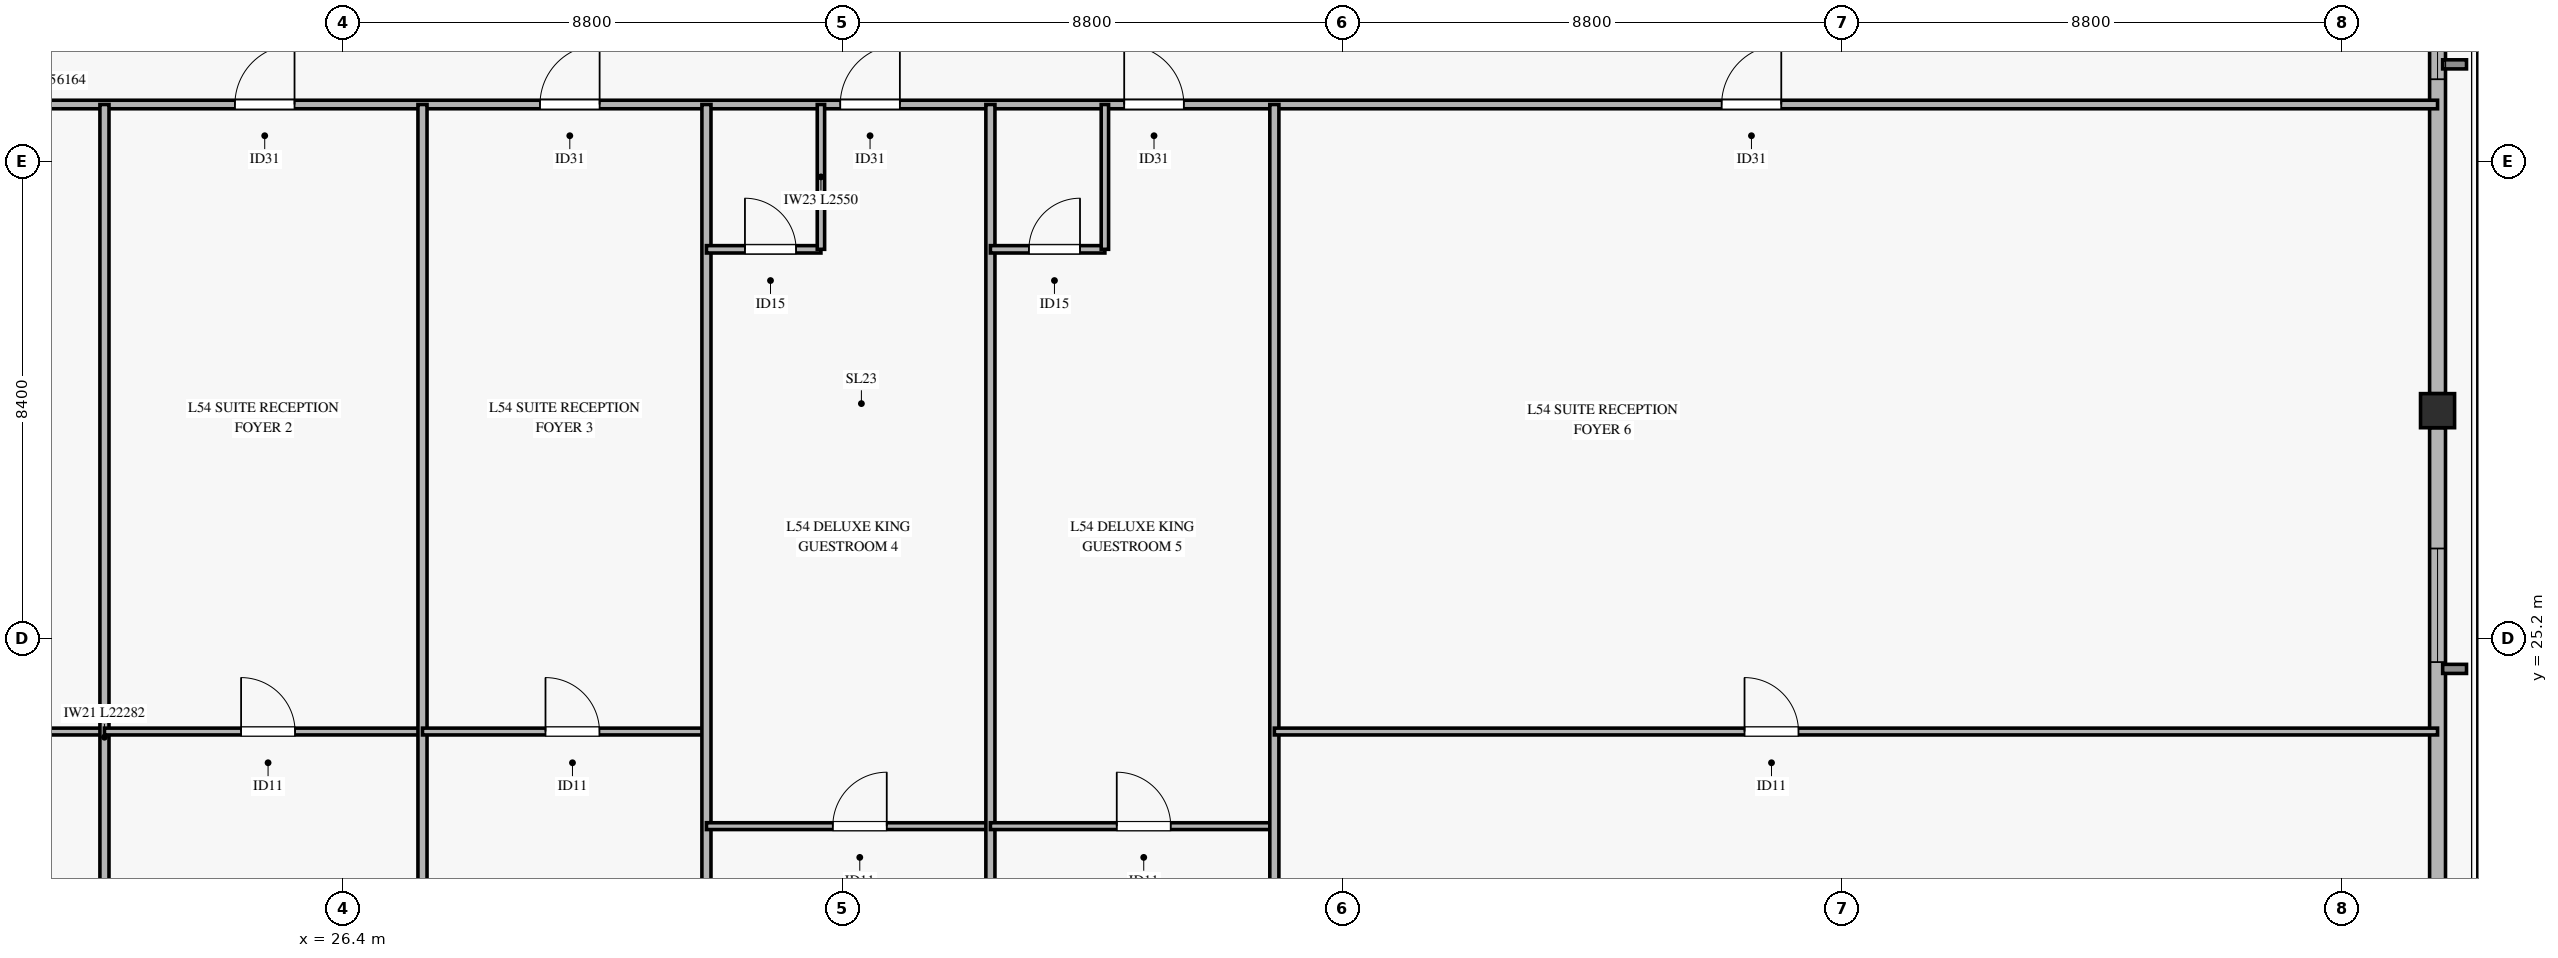
"""IFC4 building model, lengths in metres.
Left out: names, types, materials, properties, quantities, classifications, styles, units other than length and angle.
Written with IfcOpenShell. Run it as: python <this file> out.ifc"""

import sys

from ifc_helpers import new_model, si_unit, direction, frame, frame_2d, origin, origin_2d, place, context, subcontext, project, spatial, rectangle, hollow_rectangle, extrude, source, transform, mapped, element, fill, save


model = new_model("IFC4")
c1 = context("Model", 3, precision=1e-05, world=origin(), true_north=direction((0.0, 1.0)))
c2 = subcontext(c1, "Body", "Model", "MODEL_VIEW")
j1 = project(units=[si_unit("LENGTHUNIT", "METRE"), si_unit("PLANEANGLEUNIT", "RADIAN")], contexts=[c1])
p1 = place(None, origin())
s1 = spatial("IfcSite", under=j1, at=p1, CompositionType="ELEMENT")
p2 = place(p1, origin())
s2 = spatial("IfcBuilding", under=s1, at=p2, CompositionType="ELEMENT")
p3 = place(p2, frame((0.0, 0.0, 213.2)))
s3 = spatial("IfcBuildingStorey", under=s2, at=p3, CompositionType="ELEMENT", Elevation=213.2)
m1 = source(origin(), c2, "Body", "SweptSolid", [
    extrude(hollow_rectangle(XDim=0.6, YDim=0.6, WallThickness=0.028, at=origin_2d()), origin(), (0.0, 0.0, 1.0), 3.27),
])
p4 = place(p3, frame((63.282, 29.209, 0.0), z_axis=(0.0, 0.0, 1.0), x_axis=(1.0, 0.0, 0.0)))
e1 = element("IfcColumn", 1, at=p4, inside=s3, PredefinedType="COLUMN", context=c2, shape_type="MappedRepresentation", body=[
    mapped(m1, transform((0.0, 0.0, 0.0), x_axis=(1.0, 0.0, 0.0), y_axis=(0.0, 1.0, 0.0), z_axis=(0.0, 0.0, 1.0), scale=1.0)),
])
p5 = place(p3, frame((63.282, 15.072, 0.0), z_axis=(0.0, 0.0, 1.0), x_axis=(0.0, 1.0, 0.0)))
e2 = element("IfcWall", 2, at=p5, inside=s3, PredefinedType="SOLIDWALL", context=c2, shape_type="SweptSolid", body=[
    extrude(rectangle(XDim=13.837, YDim=0.28, at=frame_2d((6.918, 0.0))), origin(), (0.0, 0.0, 1.0), 2.75),
])
p6 = place(p5, frame((9.71, 0.0, 0.45)))
e3 = element("IfcOpeningElement", 3, at=p6, cuts=e2, PredefinedType="OPENING", context=c2, shape_type="SweptSolid", body=[
    extrude(rectangle(XDim=2.0, YDim=2.0, at=frame_2d((1.0, 1.0))), frame((0.0, 0.15, 0.0), z_axis=(0.0, -1.0, 0.0), x_axis=(1.0, 0.0, 0.0)), (0.0, 0.0, 1.0), 0.3),
])
p7 = place(p3, frame((63.282, 29.509, 0.0), z_axis=(0.0, 0.0, 1.0), x_axis=(0.0, 1.0, 0.0)))
e4 = element("IfcWall", 4, at=p7, inside=s3, PredefinedType="SOLIDWALL", context=c2, shape_type="SweptSolid", body=[
    extrude(rectangle(XDim=13.837, YDim=0.28, at=frame_2d((6.918, 0.0))), origin(), (0.0, 0.0, 1.0), 2.75),
])
p8 = place(p7, frame((5.536, 0.0, 0.45)))
e5 = element("IfcOpeningElement", 5, at=p8, cuts=e4, PredefinedType="OPENING", context=c2, shape_type="SweptSolid", body=[
    extrude(rectangle(XDim=2.0, YDim=2.0, at=frame_2d((1.0, 1.0))), frame((0.0, 0.15, 0.0), z_axis=(0.0, -1.0, 0.0), x_axis=(1.0, 0.0, 0.0)), (0.0, 0.0, 1.0), 0.3),
])
p9 = place(p3, frame((7.118, 34.6, 0.0), z_axis=(0.0, 0.0, 1.0), x_axis=(1.0, 0.0, 0.0)))
e6 = element("IfcWall", 6, at=p9, inside=s3, PredefinedType="PARTITIONING", context=c2, shape_type="SweptSolid", body=[
    extrude(rectangle(XDim=56.164, YDim=0.15, at=frame_2d((28.082, 0.0))), origin(), (0.0, 0.0, 1.0), 2.455),
])
p10 = place(p9, frame((6.024, 0.0, 0.0)))
e7 = element("IfcOpeningElement", 7, at=p10, cuts=e6, PredefinedType="OPENING", context=c2, shape_type="SweptSolid", body=[
    extrude(rectangle(XDim=1.05, YDim=2.15, at=frame_2d((0.525, 1.075))), frame((0.0, 0.085, 0.0), z_axis=(0.0, -1.0, 0.0), x_axis=(1.0, 0.0, 0.0)), (0.0, 0.0, 1.0), 0.17),
])
p11 = place(p9, frame((17.379, 0.0, 0.0)))
e8 = element("IfcOpeningElement", 8, at=p11, cuts=e6, PredefinedType="OPENING", context=c2, shape_type="SweptSolid", body=[
    extrude(rectangle(XDim=1.05, YDim=2.15, at=frame_2d((0.525, 1.075))), frame((0.0, 0.085, 0.0), z_axis=(0.0, -1.0, 0.0), x_axis=(1.0, 0.0, 0.0)), (0.0, 0.0, 1.0), 0.17),
])
p12 = place(p9, frame((22.751, 0.0, 0.0)))
e9 = element("IfcOpeningElement", 9, at=p12, cuts=e6, PredefinedType="OPENING", context=c2, shape_type="SweptSolid", body=[
    extrude(rectangle(XDim=1.05, YDim=2.15, at=frame_2d((0.525, 1.075))), frame((0.0, 0.085, 0.0), z_axis=(0.0, -1.0, 0.0), x_axis=(1.0, 0.0, 0.0)), (0.0, 0.0, 1.0), 0.17),
])
p13 = place(p9, frame((28.038, 0.0, 0.0)))
e10 = element("IfcOpeningElement", 10, at=p13, cuts=e6, PredefinedType="OPENING", context=c2, shape_type="SweptSolid", body=[
    extrude(rectangle(XDim=1.05, YDim=2.15, at=frame_2d((0.525, 1.075))), frame((0.0, 0.085, 0.0), z_axis=(0.0, -1.0, 0.0), x_axis=(1.0, 0.0, 0.0)), (0.0, 0.0, 1.0), 0.17),
])
p14 = place(p9, frame((33.038, 0.0, 0.0)))
e11 = element("IfcOpeningElement", 11, at=p14, cuts=e6, PredefinedType="OPENING", context=c2, shape_type="SweptSolid", body=[
    extrude(rectangle(XDim=1.05, YDim=2.15, at=frame_2d((0.525, 1.075))), frame((0.0, 0.085, 0.0), z_axis=(0.0, -1.0, 0.0), x_axis=(1.0, 0.0, 0.0)), (0.0, 0.0, 1.0), 0.17),
])
p15 = place(p9, frame((43.558, 0.0, 0.0)))
e12 = element("IfcOpeningElement", 12, at=p15, cuts=e6, PredefinedType="OPENING", context=c2, shape_type="SweptSolid", body=[
    extrude(rectangle(XDim=1.05, YDim=2.15, at=frame_2d((0.525, 1.075))), frame((0.0, 0.085, 0.0), z_axis=(0.0, -1.0, 0.0), x_axis=(1.0, 0.0, 0.0)), (0.0, 0.0, 1.0), 0.17),
])
p16 = place(p3, frame((7.118, 23.559, 0.0), z_axis=(0.0, 0.0, 1.0), x_axis=(1.0, 0.0, 0.0)))
e13 = element("IfcWall", 13, at=p16, inside=s3, PredefinedType="PARTITIONING", context=c2, shape_type="SweptSolid", body=[
    extrude(rectangle(XDim=15.082, YDim=0.12, at=frame_2d((7.541, 0.0))), origin(), (0.0, 0.0, 1.0), 2.455),
])
p17 = place(p16, frame((6.319, 0.0, 0.0)))
e14 = element("IfcOpeningElement", 14, at=p17, cuts=e13, PredefinedType="OPENING", context=c2, shape_type="SweptSolid", body=[
    extrude(rectangle(XDim=0.95, YDim=2.1, at=frame_2d((0.475, 1.05))), frame((0.0, 0.07, 0.0), z_axis=(0.0, -1.0, 0.0), x_axis=(1.0, 0.0, 0.0)), (0.0, 0.0, 1.0), 0.14),
])
p18 = place(p3, frame((22.2, 12.318, 0.0), z_axis=(0.0, 0.0, 1.0), x_axis=(0.0, 1.0, 0.0)))
e15 = element("IfcWall", 15, at=p18, inside=s3, PredefinedType="PARTITIONING", context=c2, shape_type="SweptSolid", body=[
    extrude(rectangle(XDim=22.282, YDim=0.16, at=frame_2d((11.141, 0.0))), origin(), (0.0, 0.0, 1.0), 2.755),
])
p19 = place(p3, frame((22.2, 23.559, 0.0), z_axis=(0.0, 0.0, 1.0), x_axis=(1.0, 0.0, 0.0)))
e16 = element("IfcWall", 16, at=p19, inside=s3, PredefinedType="PARTITIONING", context=c2, shape_type="SweptSolid", body=[
    extrude(rectangle(XDim=5.6, YDim=0.12, at=frame_2d((2.8, 0.0))), origin(), (0.0, 0.0, 1.0), 3.27),
])
p20 = place(p19, frame((2.406, 0.0, 0.0)))
e17 = element("IfcOpeningElement", 17, at=p20, cuts=e16, PredefinedType="OPENING", context=c2, shape_type="SweptSolid", body=[
    extrude(rectangle(XDim=0.95, YDim=2.1, at=frame_2d((0.475, 1.05))), frame((0.0, 0.07, 0.0), z_axis=(0.0, -1.0, 0.0), x_axis=(1.0, 0.0, 0.0)), (0.0, 0.0, 1.0), 0.14),
])
p21 = place(p3, frame((27.8, 12.318, 0.0), z_axis=(0.0, 0.0, 1.0), x_axis=(0.0, 1.0, 0.0)))
e18 = element("IfcWall", 18, at=p21, inside=s3, PredefinedType="PARTITIONING", context=c2, shape_type="SweptSolid", body=[
    extrude(rectangle(XDim=22.282, YDim=0.16, at=frame_2d((11.141, 0.0))), origin(), (0.0, 0.0, 1.0), 2.755),
])
p22 = place(p3, frame((27.8, 23.559, 0.0), z_axis=(0.0, 0.0, 1.0), x_axis=(1.0, 0.0, 0.0)))
e19 = element("IfcWall", 19, at=p22, inside=s3, PredefinedType="PARTITIONING", context=c2, shape_type="SweptSolid", body=[
    extrude(rectangle(XDim=5.0, YDim=0.12, at=frame_2d((2.5, 0.0))), origin(), (0.0, 0.0, 1.0), 2.455),
])
p23 = place(p22, frame((2.166, 0.0, 0.0)))
e20 = element("IfcOpeningElement", 20, at=p23, cuts=e19, PredefinedType="OPENING", context=c2, shape_type="SweptSolid", body=[
    extrude(rectangle(XDim=0.95, YDim=2.1, at=frame_2d((0.475, 1.05))), frame((0.0, 0.07, 0.0), z_axis=(0.0, -1.0, 0.0), x_axis=(1.0, 0.0, 0.0)), (0.0, 0.0, 1.0), 0.14),
])
p24 = place(p3, frame((32.8, 12.318, 0.0), z_axis=(0.0, 0.0, 1.0), x_axis=(0.0, 1.0, 0.0)))
e21 = element("IfcWall", 21, at=p24, inside=s3, PredefinedType="PARTITIONING", context=c2, shape_type="SweptSolid", body=[
    extrude(rectangle(XDim=22.282, YDim=0.16, at=frame_2d((11.141, 0.0))), origin(), (0.0, 0.0, 1.0), 2.755),
])
p25 = place(p3, frame((32.8, 32.05, 0.0), z_axis=(0.0, 0.0, 1.0), x_axis=(1.0, 0.0, 0.0)))
e22 = element("IfcWall", 22, at=p25, inside=s3, PredefinedType="PARTITIONING", context=c2, shape_type="SweptSolid", body=[
    extrude(rectangle(XDim=2.016, YDim=0.13, at=frame_2d((1.008, 0.0))), origin(), (0.0, 0.0, 1.0), 3.27),
])
p26 = place(p25, frame((0.678, 0.0, 0.0)))
e23 = element("IfcOpeningElement", 23, at=p26, cuts=e22, PredefinedType="OPENING", context=c2, shape_type="SweptSolid", body=[
    extrude(rectangle(XDim=0.9, YDim=2.1, at=frame_2d((0.45, 1.05))), frame((0.0, 0.075, 0.0), z_axis=(0.0, -1.0, 0.0), x_axis=(1.0, 0.0, 0.0)), (0.0, 0.0, 1.0), 0.15),
])
p27 = place(p3, frame((34.816, 32.05, 0.0), z_axis=(0.0, 0.0, 1.0), x_axis=(0.0, 1.0, 0.0)))
e24 = element("IfcWall", 24, at=p27, inside=s3, PredefinedType="PARTITIONING", context=c2, shape_type="SweptSolid", body=[
    extrude(rectangle(XDim=2.55, YDim=0.13, at=frame_2d((1.275, 0.0))), origin(), (0.0, 0.0, 1.0), 2.855),
])
p28 = place(p3, frame((32.8, 21.893, 0.0), z_axis=(0.0, 0.0, 1.0), x_axis=(1.0, 0.0, 0.0)))
e25 = element("IfcWall", 25, at=p28, inside=s3, PredefinedType="PARTITIONING", context=c2, shape_type="SweptSolid", body=[
    extrude(rectangle(XDim=5.0, YDim=0.12, at=frame_2d((2.5, 0.0))), origin(), (0.0, 0.0, 1.0), 2.455),
])
p29 = place(p28, frame((2.225, 0.0, 0.0)))
e26 = element("IfcOpeningElement", 26, at=p29, cuts=e25, PredefinedType="OPENING", context=c2, shape_type="SweptSolid", body=[
    extrude(rectangle(XDim=0.95, YDim=2.1, at=frame_2d((0.475, 1.05))), frame((0.0, 0.07, 0.0), z_axis=(0.0, -1.0, 0.0), x_axis=(1.0, 0.0, 0.0)), (0.0, 0.0, 1.0), 0.14),
])
p30 = place(p3, frame((37.8, 12.318, 0.0), z_axis=(0.0, 0.0, 1.0), x_axis=(0.0, 1.0, 0.0)))
e27 = element("IfcWall", 27, at=p30, inside=s3, PredefinedType="PARTITIONING", context=c2, shape_type="SweptSolid", body=[
    extrude(rectangle(XDim=22.282, YDim=0.16, at=frame_2d((11.141, 0.0))), origin(), (0.0, 0.0, 1.0), 2.455),
])
p31 = place(p3, frame((37.8, 32.05, 0.0), z_axis=(0.0, 0.0, 1.0), x_axis=(1.0, 0.0, 0.0)))
e28 = element("IfcWall", 28, at=p31, inside=s3, PredefinedType="PARTITIONING", context=c2, shape_type="SweptSolid", body=[
    extrude(rectangle(XDim=2.016, YDim=0.13, at=frame_2d((1.008, 0.0))), origin(), (0.0, 0.0, 1.0), 3.27),
])
p32 = place(p31, frame((0.678, 0.0, 0.0)))
e29 = element("IfcOpeningElement", 29, at=p32, cuts=e28, PredefinedType="OPENING", context=c2, shape_type="SweptSolid", body=[
    extrude(rectangle(XDim=0.9, YDim=2.1, at=frame_2d((0.45, 1.05))), frame((0.0, 0.075, 0.0), z_axis=(0.0, -1.0, 0.0), x_axis=(1.0, 0.0, 0.0)), (0.0, 0.0, 1.0), 0.15),
])
p33 = place(p3, frame((39.816, 32.05, 0.0), z_axis=(0.0, 0.0, 1.0), x_axis=(0.0, 1.0, 0.0)))
e30 = element("IfcWall", 30, at=p33, inside=s3, PredefinedType="PARTITIONING", context=c2, shape_type="SweptSolid", body=[
    extrude(rectangle(XDim=2.55, YDim=0.13, at=frame_2d((1.275, 0.0))), origin(), (0.0, 0.0, 1.0), 2.855),
])
p34 = place(p3, frame((37.8, 21.893, 0.0), z_axis=(0.0, 0.0, 1.0), x_axis=(1.0, 0.0, 0.0)))
e31 = element("IfcWall", 31, at=p34, inside=s3, PredefinedType="PARTITIONING", context=c2, shape_type="SweptSolid", body=[
    extrude(rectangle(XDim=5.0, YDim=0.12, at=frame_2d((2.5, 0.0))), origin(), (0.0, 0.0, 1.0), 3.27),
])
p35 = place(p34, frame((2.225, 0.0, 0.0)))
e32 = element("IfcOpeningElement", 32, at=p35, cuts=e31, PredefinedType="OPENING", context=c2, shape_type="SweptSolid", body=[
    extrude(rectangle(XDim=0.95, YDim=2.1, at=frame_2d((0.475, 1.05))), frame((0.0, 0.07, 0.0), z_axis=(0.0, -1.0, 0.0), x_axis=(1.0, 0.0, 0.0)), (0.0, 0.0, 1.0), 0.14),
])
p36 = place(p3, frame((42.8, 12.318, 0.0), z_axis=(0.0, 0.0, 1.0), x_axis=(0.0, 1.0, 0.0)))
e33 = element("IfcWall", 33, at=p36, inside=s3, PredefinedType="PARTITIONING", context=c2, shape_type="SweptSolid", body=[
    extrude(rectangle(XDim=22.282, YDim=0.16, at=frame_2d((11.141, 0.0))), origin(), (0.0, 0.0, 1.0), 2.755),
])
p37 = place(p3, frame((42.8, 23.559, 0.0), z_axis=(0.0, 0.0, 1.0), x_axis=(1.0, 0.0, 0.0)))
e34 = element("IfcWall", 34, at=p37, inside=s3, PredefinedType="PARTITIONING", context=c2, shape_type="SweptSolid", body=[
    extrude(rectangle(XDim=20.482, YDim=0.12, at=frame_2d((10.241, 0.0))), origin(), (0.0, 0.0, 1.0), 2.455),
])
p38 = place(p37, frame((8.279, 0.0, 0.0)))
e35 = element("IfcOpeningElement", 35, at=p38, cuts=e34, PredefinedType="OPENING", context=c2, shape_type="SweptSolid", body=[
    extrude(rectangle(XDim=0.95, YDim=2.1, at=frame_2d((0.475, 1.05))), frame((0.0, 0.07, 0.0), z_axis=(0.0, -1.0, 0.0), x_axis=(1.0, 0.0, 0.0)), (0.0, 0.0, 1.0), 0.14),
])
m2 = source(origin(), c2, "Body", "SweptSolid", [
    extrude(rectangle(XDim=2.0, YDim=2.0, at=frame_2d((1.0, 1.0))), frame((0.0, 0.03, 0.0), z_axis=(0.0, -1.0, 0.0), x_axis=(1.0, 0.0, 0.0)), (0.0, 0.0, 1.0), 0.06),
])
p39 = place(p6, origin())
e36 = element("IfcWindow", 36, at=p39, inside=s3, PartitioningType="SINGLE_PANEL", PredefinedType="WINDOW", context=c2, shape_type="MappedRepresentation", body=[
    mapped(m2, transform((0.0, 0.0, 0.0), x_axis=(1.0, 0.0, 0.0), y_axis=(0.0, 1.0, 0.0), z_axis=(0.0, 0.0, 1.0), scale=1.0)),
])
fill(e3, e36)
p40 = place(p8, origin())
e37 = element("IfcWindow", 37, at=p40, inside=s3, PartitioningType="SINGLE_PANEL", PredefinedType="WINDOW", context=c2, shape_type="MappedRepresentation", body=[
    mapped(m2, transform((0.0, 0.0, 0.0), x_axis=(1.0, 0.0, 0.0), y_axis=(0.0, 1.0, 0.0), z_axis=(0.0, 0.0, 1.0), scale=1.0)),
])
fill(e5, e37)
m3 = source(origin(), c2, "Body", "SweptSolid", [
    extrude(rectangle(XDim=1.05, YDim=2.15, at=frame_2d((0.525, 1.075))), frame((0.0, 0.025, 0.0), z_axis=(0.0, -1.0, 0.0), x_axis=(1.0, 0.0, 0.0)), (0.0, 0.0, 1.0), 0.05),
])
p41 = place(p11, origin())
e38 = element("IfcDoor", 38, at=p41, inside=s3, OperationType="SINGLE_SWING_RIGHT", PredefinedType="DOOR", context=c2, shape_type="MappedRepresentation", body=[
    mapped(m3, transform((0.0, 0.0, 0.0), x_axis=(1.0, 0.0, 0.0), y_axis=(0.0, 1.0, 0.0), z_axis=(0.0, 0.0, 1.0), scale=1.0)),
])
fill(e8, e38)
m4 = source(origin(), c2, "Body", "SweptSolid", [
    extrude(rectangle(XDim=0.95, YDim=2.1, at=frame_2d((0.475, 1.05))), frame((0.0, 0.025, 0.0), z_axis=(0.0, -1.0, 0.0), x_axis=(1.0, 0.0, 0.0)), (0.0, 0.0, 1.0), 0.05),
])
p42 = place(p20, origin())
e39 = element("IfcDoor", 39, at=p42, inside=s3, OperationType="SINGLE_SWING_LEFT", PredefinedType="DOOR", context=c2, shape_type="MappedRepresentation", body=[
    mapped(m4, transform((0.0, 0.0, 0.0), x_axis=(1.0, 0.0, 0.0), y_axis=(0.0, 1.0, 0.0), z_axis=(0.0, 0.0, 1.0), scale=1.0)),
])
fill(e17, e39)
p43 = place(p12, origin())
e40 = element("IfcDoor", 40, at=p43, inside=s3, OperationType="SINGLE_SWING_RIGHT", PredefinedType="DOOR", context=c2, shape_type="MappedRepresentation", body=[
    mapped(m3, transform((0.0, 0.0, 0.0), x_axis=(1.0, 0.0, 0.0), y_axis=(0.0, 1.0, 0.0), z_axis=(0.0, 0.0, 1.0), scale=1.0)),
])
fill(e9, e40)
p44 = place(p23, origin())
e41 = element("IfcDoor", 41, at=p44, inside=s3, OperationType="SINGLE_SWING_LEFT", PredefinedType="DOOR", context=c2, shape_type="MappedRepresentation", body=[
    mapped(m4, transform((0.0, 0.0, 0.0), x_axis=(1.0, 0.0, 0.0), y_axis=(0.0, 1.0, 0.0), z_axis=(0.0, 0.0, 1.0), scale=1.0)),
])
fill(e20, e41)
p45 = place(p13, origin())
e42 = element("IfcDoor", 42, at=p45, inside=s3, OperationType="SINGLE_SWING_RIGHT", PredefinedType="DOOR", context=c2, shape_type="MappedRepresentation", body=[
    mapped(m3, transform((0.0, 0.0, 0.0), x_axis=(1.0, 0.0, 0.0), y_axis=(0.0, 1.0, 0.0), z_axis=(0.0, 0.0, 1.0), scale=1.0)),
])
fill(e10, e42)
m5 = source(origin(), c2, "Body", "SweptSolid", [
    extrude(rectangle(XDim=0.9, YDim=2.1, at=frame_2d((0.45, 1.05))), frame((0.0, 0.025, 0.0), z_axis=(0.0, -1.0, 0.0), x_axis=(1.0, 0.0, 0.0)), (0.0, 0.0, 1.0), 0.05),
])
p46 = place(p26, origin())
e43 = element("IfcDoor", 43, at=p46, inside=s3, OperationType="SINGLE_SWING_LEFT", PredefinedType="DOOR", context=c2, shape_type="MappedRepresentation", body=[
    mapped(m5, transform((0.0, 0.0, 0.0), x_axis=(1.0, 0.0, 0.0), y_axis=(0.0, 1.0, 0.0), z_axis=(0.0, 0.0, 1.0), scale=1.0)),
])
fill(e23, e43)
p47 = place(p29, origin())
e44 = element("IfcDoor", 44, at=p47, inside=s3, OperationType="SINGLE_SWING_RIGHT", PredefinedType="DOOR", context=c2, shape_type="MappedRepresentation", body=[
    mapped(m4, transform((0.0, 0.0, 0.0), x_axis=(1.0, 0.0, 0.0), y_axis=(0.0, 1.0, 0.0), z_axis=(0.0, 0.0, 1.0), scale=1.0)),
])
fill(e26, e44)
p48 = place(p14, origin())
e45 = element("IfcDoor", 45, at=p48, inside=s3, OperationType="SINGLE_SWING_LEFT", PredefinedType="DOOR", context=c2, shape_type="MappedRepresentation", body=[
    mapped(m3, transform((0.0, 0.0, 0.0), x_axis=(1.0, 0.0, 0.0), y_axis=(0.0, 1.0, 0.0), z_axis=(0.0, 0.0, 1.0), scale=1.0)),
])
fill(e11, e45)
p49 = place(p32, origin())
e46 = element("IfcDoor", 46, at=p49, inside=s3, OperationType="SINGLE_SWING_RIGHT", PredefinedType="DOOR", context=c2, shape_type="MappedRepresentation", body=[
    mapped(m5, transform((0.0, 0.0, 0.0), x_axis=(1.0, 0.0, 0.0), y_axis=(0.0, 1.0, 0.0), z_axis=(0.0, 0.0, 1.0), scale=1.0)),
])
fill(e29, e46)
p50 = place(p35, origin())
e47 = element("IfcDoor", 47, at=p50, inside=s3, OperationType="SINGLE_SWING_LEFT", PredefinedType="DOOR", context=c2, shape_type="MappedRepresentation", body=[
    mapped(m4, transform((0.0, 0.0, 0.0), x_axis=(1.0, 0.0, 0.0), y_axis=(0.0, 1.0, 0.0), z_axis=(0.0, 0.0, 1.0), scale=1.0)),
])
fill(e32, e47)
p51 = place(p15, origin())
e48 = element("IfcDoor", 48, at=p51, inside=s3, OperationType="SINGLE_SWING_RIGHT", PredefinedType="DOOR", context=c2, shape_type="MappedRepresentation", body=[
    mapped(m3, transform((0.0, 0.0, 0.0), x_axis=(1.0, 0.0, 0.0), y_axis=(0.0, 1.0, 0.0), z_axis=(0.0, 0.0, 1.0), scale=1.0)),
])
fill(e12, e48)
p52 = place(p38, origin())
e49 = element("IfcDoor", 49, at=p52, inside=s3, OperationType="SINGLE_SWING_LEFT", PredefinedType="DOOR", context=c2, shape_type="MappedRepresentation", body=[
    mapped(m4, transform((0.0, 0.0, 0.0), x_axis=(1.0, 0.0, 0.0), y_axis=(0.0, 1.0, 0.0), z_axis=(0.0, 0.0, 1.0), scale=1.0)),
])
fill(e35, e49)
save(model, sys.argv[1])
